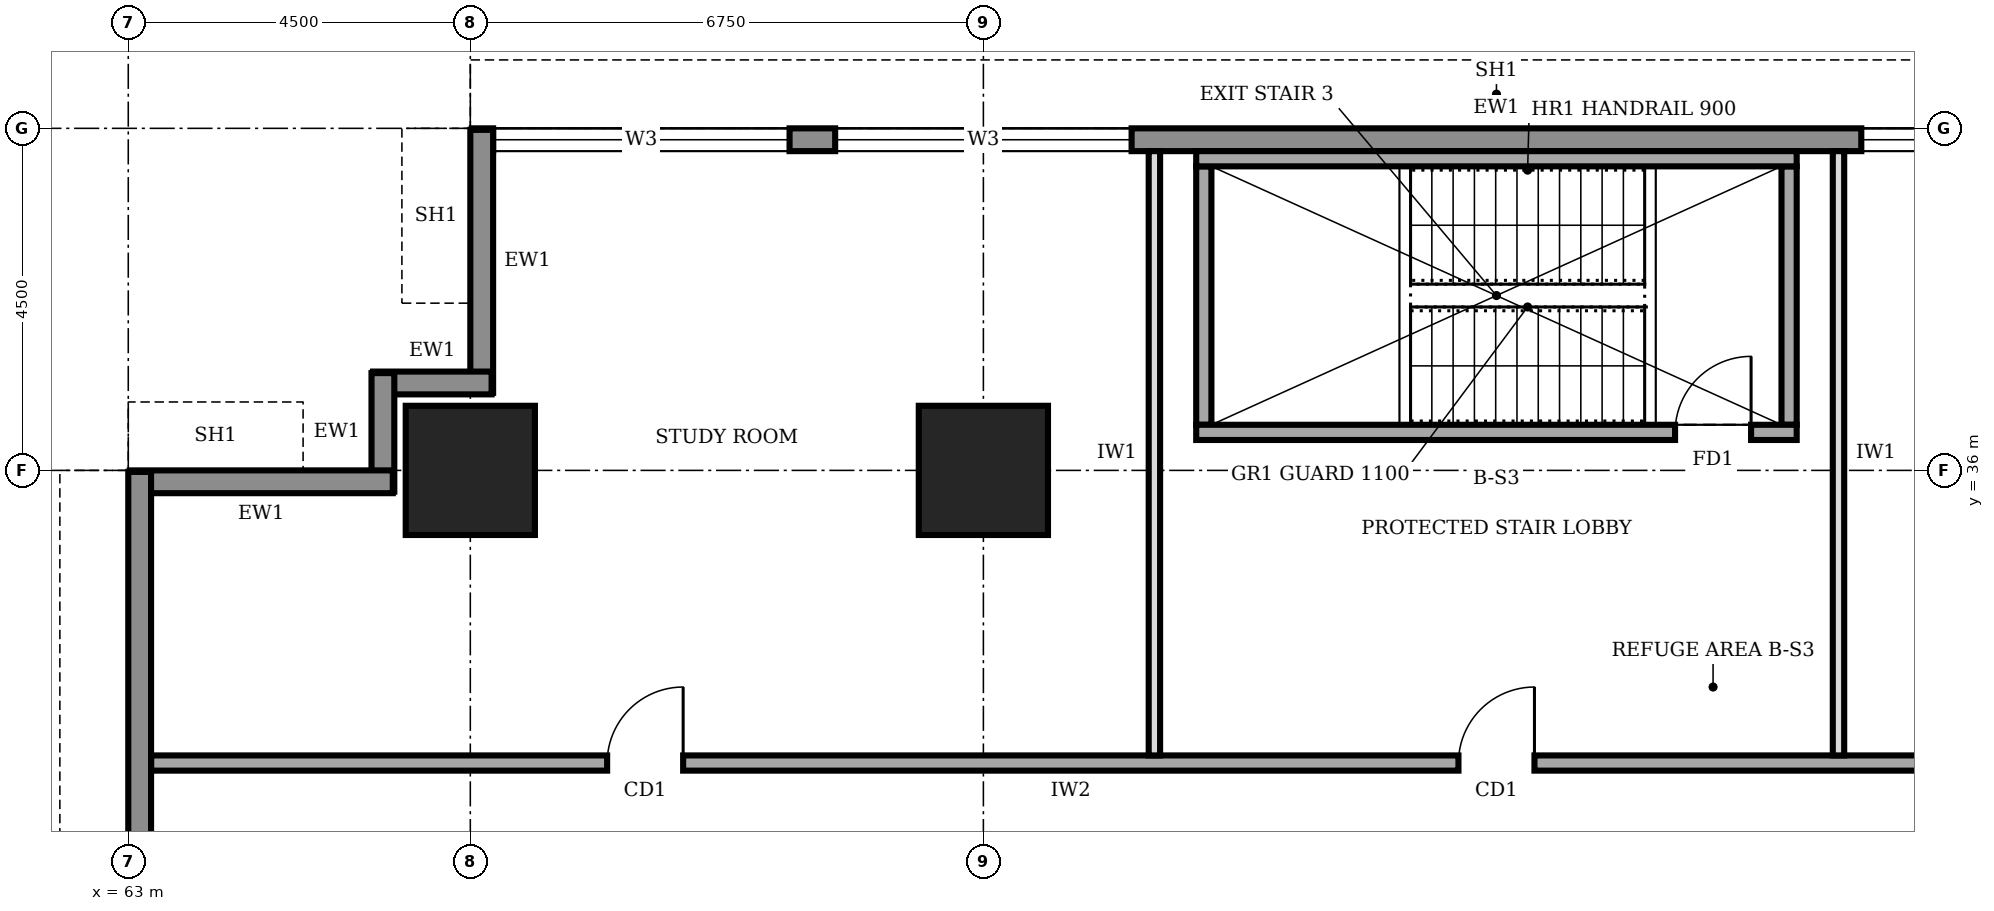
"""IFC4 building model, lengths in metres.
Left out: names, types, materials, properties, quantities, classifications, styles, units other than length and angle.
Written with IfcOpenShell. Run it as: python <this file> out.ifc"""

import sys

from ifc_helpers import new_model, si_unit, direction, frame, frame_2d, origin, origin_2d, place, context, subcontext, project, spatial, rectangle, extrude, element, fill, save


model = new_model("IFC4")
c1 = context("Model", 3, precision=1e-05, world=origin(), true_north=direction((0.0, 1.0)))
c2 = subcontext(c1, "Body", "Model", "MODEL_VIEW")
j1 = project(units=[si_unit("LENGTHUNIT", "METRE"), si_unit("PLANEANGLEUNIT", "RADIAN")], contexts=[c1])
p1 = place(None, origin())
s1 = spatial("IfcSite", under=j1, at=p1, CompositionType="ELEMENT")
p2 = place(p1, origin())
s2 = spatial("IfcBuilding", under=s1, at=p2, CompositionType="ELEMENT")
p3 = place(p2, frame((0.0, 0.0, 101.0)))
s3 = spatial("IfcBuildingStorey", under=s2, at=p3, CompositionType="ELEMENT", Elevation=101.0)
for number, where, z_axis, x_axis in (
    (1, (67.5, 36.0, 0.0), (0.0, 0.0, 1.0), (1.0, 0.0, 0.0)),
    (2, (74.25, 36.0, 0.0), (0.0, 0.0, 1.0), (1.0, 0.0, 0.0)),
):
    element("IfcColumn", number, at=place(p3, frame(where, z_axis=z_axis, x_axis=x_axis)), inside=s3, PredefinedType="COLUMN", context=c2, shape_type="SweptSolid", body=[
        extrude(rectangle(XDim=1.7, YDim=1.7, at=origin_2d()), origin(), (0.0, 0.0, 1.0), 4.0),
    ])
p4 = place(p3, frame((94.48, 40.35, 0.0), z_axis=(0.0, 0.0, 1.0), x_axis=(-1.0, 0.0, 0.0)))
e3 = element("IfcWall", 3, at=p4, inside=s3, PredefinedType="STANDARD", context=c2, shape_type="SweptSolid", body=[
    extrude(rectangle(XDim=26.96, YDim=0.3, at=frame_2d((13.48, 0.0))), origin(), (0.0, 0.0, 1.0), 3.75),
])
p5 = place(p4, frame((22.78, 0.0, 0.95)))
e4 = element("IfcOpeningElement", 4, at=p5, cuts=e3, PredefinedType="OPENING", context=c2, shape_type="SweptSolid", body=[
    extrude(rectangle(XDim=3.9, YDim=1.8, at=frame_2d((1.95, 0.9))), frame((0.0, 0.16, 0.0), z_axis=(0.0, -1.0, 0.0), x_axis=(1.0, 0.0, 0.0)), (0.0, 0.0, 1.0), 0.32),
])
p6 = place(p4, frame((18.28, 0.0, 0.95)))
e5 = element("IfcOpeningElement", 5, at=p6, cuts=e3, PredefinedType="OPENING", context=c2, shape_type="SweptSolid", body=[
    extrude(rectangle(XDim=3.9, YDim=1.8, at=frame_2d((1.95, 0.9))), frame((0.0, 0.16, 0.0), z_axis=(0.0, -1.0, 0.0), x_axis=(1.0, 0.0, 0.0)), (0.0, 0.0, 1.0), 0.32),
])
p7 = place(p4, frame((4.78, 0.0, 0.95)))
e6 = element("IfcOpeningElement", 6, at=p7, cuts=e3, PredefinedType="OPENING", context=c2, shape_type="SweptSolid", body=[
    extrude(rectangle(XDim=3.9, YDim=1.8, at=frame_2d((1.95, 0.9))), frame((0.0, 0.16, 0.0), z_axis=(0.0, -1.0, 0.0), x_axis=(1.0, 0.0, 0.0)), (0.0, 0.0, 1.0), 0.32),
])
p8 = place(p3, frame((67.65, 40.48, 0.0), z_axis=(0.0, 0.0, 1.0), x_axis=(0.0, -1.0, 0.0)))
e7 = element("IfcWall", 7, at=p8, inside=s3, PredefinedType="STANDARD", context=c2, shape_type="SweptSolid", body=[
    extrude(rectangle(XDim=3.46, YDim=0.3, at=frame_2d((1.73, 0.0))), origin(), (0.0, 0.0, 1.0), 2.85),
])
for number, where, z_axis, x_axis in (
    (8, (67.78, 37.15, 0.0), (0.0, 0.0, 1.0), (-1.0, 0.0, 0.0)),
    (9, (66.35, 37.28, 0.0), (0.0, 0.0, 1.0), (0.0, -1.0, 0.0)),
):
    element("IfcWall", number, at=place(p3, frame(where, z_axis=z_axis, x_axis=x_axis)), inside=s3, PredefinedType="STANDARD", context=c2, shape_type="SweptSolid", body=[
        extrude(rectangle(XDim=1.56, YDim=0.3, at=frame_2d((0.78, 0.0))), origin(), (0.0, 0.0, 1.0), 3.75),
    ])
p9 = place(p3, frame((66.48, 35.85, 0.0), z_axis=(0.0, 0.0, 1.0), x_axis=(-1.0, 0.0, 0.0)))
e10 = element("IfcWall", 10, at=p9, inside=s3, PredefinedType="STANDARD", context=c2, shape_type="SweptSolid", body=[
    extrude(rectangle(XDim=3.46, YDim=0.3, at=frame_2d((1.73, 0.0))), origin(), (0.0, 0.0, 1.0), 2.85),
])
p10 = place(p3, frame((63.15, 35.98, 0.0), z_axis=(0.0, 0.0, 1.0), x_axis=(0.0, -1.0, 0.0)))
e11 = element("IfcWall", 11, at=p10, inside=s3, PredefinedType="STANDARD", context=c2, shape_type="SweptSolid", body=[
    extrude(rectangle(XDim=6.73, YDim=0.3, at=frame_2d((3.365, 0.0))), origin(), (0.0, 0.0, 1.0), 3.75),
])
p11 = place(p3, frame((89.35, 32.15, 0.0), z_axis=(0.0, 0.0, 1.0), x_axis=(-1.0, 0.0, 0.0)))
e12 = element("IfcWall", 12, at=p11, inside=s3, PredefinedType="SOLIDWALL", context=c2, shape_type="SweptSolid", body=[
    extrude(rectangle(XDim=26.05, YDim=0.2, at=frame_2d((13.025, 0.0))), origin(), (0.0, 0.0, 1.0), 3.75),
])
p12 = place(p11, frame((19.05, 0.0, 0.0)))
e13 = element("IfcOpeningElement", 13, at=p12, cuts=e12, PredefinedType="OPENING", context=c2, shape_type="SweptSolid", body=[
    extrude(rectangle(XDim=1.0, YDim=2.1, at=frame_2d((0.5, 1.05))), frame((0.0, 0.11, 0.0), z_axis=(0.0, -1.0, 0.0), x_axis=(1.0, 0.0, 0.0)), (0.0, 0.0, 1.0), 0.22),
])
p13 = place(p11, frame((7.85, 0.0, 0.0)))
e14 = element("IfcOpeningElement", 14, at=p13, cuts=e12, PredefinedType="OPENING", context=c2, shape_type="SweptSolid", body=[
    extrude(rectangle(XDim=1.0, YDim=2.1, at=frame_2d((0.5, 1.05))), frame((0.0, 0.11, 0.0), z_axis=(0.0, -1.0, 0.0), x_axis=(1.0, 0.0, 0.0)), (0.0, 0.0, 1.0), 0.22),
])
p14 = place(p11, frame((1.325, 0.0, 0.0)))
e15 = element("IfcOpeningElement", 15, at=p14, cuts=e12, PredefinedType="OPENING", context=c2, shape_type="SweptSolid", body=[
    extrude(rectangle(XDim=1.0, YDim=2.1, at=frame_2d((0.5, 1.05))), frame((0.0, 0.11, 0.0), z_axis=(0.0, -1.0, 0.0), x_axis=(1.0, 0.0, 0.0)), (0.0, 0.0, 1.0), 0.22),
])
for number, where, z_axis, x_axis in (
    (16, (76.5, 32.25, 0.0), (0.0, 0.0, 1.0), (0.0, 1.0, 0.0)),
    (17, (85.5, 32.25, 0.0), (0.0, 0.0, 1.0), (0.0, 1.0, 0.0)),
):
    element("IfcWall", number, at=place(p3, frame(where, z_axis=z_axis, x_axis=x_axis)), inside=s3, PredefinedType="PARTITIONING", context=c2, shape_type="SweptSolid", body=[
        extrude(rectangle(XDim=7.95, YDim=0.15, at=frame_2d((3.975, 0.0))), origin(), (0.0, 0.0, 1.0), 3.75),
    ])
p15 = place(p3, frame((77.05, 36.5, 0.0), z_axis=(0.0, 0.0, 1.0), x_axis=(1.0, 0.0, 0.0)))
e18 = element("IfcWall", 18, at=p15, inside=s3, PredefinedType="SOLIDWALL", context=c2, shape_type="SweptSolid", body=[
    extrude(rectangle(XDim=7.9, YDim=0.2, at=frame_2d((3.95, 0.0))), origin(), (0.0, 0.0, 1.0), 3.75),
])
p16 = place(p15, frame((6.3, 0.0, 0.0)))
e19 = element("IfcOpeningElement", 19, at=p16, cuts=e18, PredefinedType="OPENING", context=c2, shape_type="SweptSolid", body=[
    extrude(rectangle(XDim=1.0, YDim=2.1, at=frame_2d((0.5, 1.05))), frame((0.0, 0.11, 0.0), z_axis=(0.0, -1.0, 0.0), x_axis=(1.0, 0.0, 0.0)), (0.0, 0.0, 1.0), 0.22),
])
p17 = place(p3, frame((77.05, 40.1, 0.0), z_axis=(0.0, 0.0, 1.0), x_axis=(1.0, 0.0, 0.0)))
e20 = element("IfcWall", 20, at=p17, inside=s3, PredefinedType="SOLIDWALL", context=c2, shape_type="SweptSolid", body=[
    extrude(rectangle(XDim=7.9, YDim=0.2, at=frame_2d((3.95, 0.0))), origin(), (0.0, 0.0, 1.0), 3.75),
])
for number, where, z_axis, x_axis in (
    (21, (77.15, 36.6, 0.0), (0.0, 0.0, 1.0), (0.0, 1.0, 0.0)),
    (22, (84.85, 36.6, 0.0), (0.0, 0.0, 1.0), (0.0, 1.0, 0.0)),
):
    element("IfcWall", number, at=place(p3, frame(where, z_axis=z_axis, x_axis=x_axis)), inside=s3, PredefinedType="SOLIDWALL", context=c2, shape_type="SweptSolid", body=[
        extrude(rectangle(XDim=3.4, YDim=0.2, at=frame_2d((1.7, 0.0))), origin(), (0.0, 0.0, 1.0), 3.75),
    ])
p18 = place(p5, origin())
e23 = element("IfcWindow", 23, at=p18, inside=s3, PartitioningType="SINGLE_PANEL", PredefinedType="WINDOW", context=c2, shape_type="SweptSolid", body=[
    extrude(rectangle(XDim=3.9, YDim=1.8, at=frame_2d((1.95, 0.9))), frame((0.0, 0.03, 0.0), z_axis=(0.0, -1.0, 0.0), x_axis=(1.0, 0.0, 0.0)), (0.0, 0.0, 1.0), 0.06),
])
fill(e4, e23)
p19 = place(p6, origin())
e24 = element("IfcWindow", 24, at=p19, inside=s3, PartitioningType="SINGLE_PANEL", PredefinedType="WINDOW", context=c2, shape_type="SweptSolid", body=[
    extrude(rectangle(XDim=3.9, YDim=1.8, at=frame_2d((1.95, 0.9))), frame((0.0, 0.03, 0.0), z_axis=(0.0, -1.0, 0.0), x_axis=(1.0, 0.0, 0.0)), (0.0, 0.0, 1.0), 0.06),
])
fill(e5, e24)
p20 = place(p7, origin())
e25 = element("IfcWindow", 25, at=p20, inside=s3, PartitioningType="SINGLE_PANEL", PredefinedType="WINDOW", context=c2, shape_type="SweptSolid", body=[
    extrude(rectangle(XDim=3.9, YDim=1.8, at=frame_2d((1.95, 0.9))), frame((0.0, 0.03, 0.0), z_axis=(0.0, -1.0, 0.0), x_axis=(1.0, 0.0, 0.0)), (0.0, 0.0, 1.0), 0.06),
])
fill(e6, e25)
p21 = place(p12, frame((1.0, 0.0, 0.0), z_axis=(0.0, 0.0, 1.0), x_axis=(-1.0, 0.0, 0.0)))
e26 = element("IfcDoor", 26, at=p21, inside=s3, OperationType="SINGLE_SWING_RIGHT", PredefinedType="DOOR", context=c2, shape_type="SweptSolid", body=[
    extrude(rectangle(XDim=1.0, YDim=2.1, at=frame_2d((0.5, 1.05))), frame((0.0, 0.025, 0.0), z_axis=(0.0, -1.0, 0.0), x_axis=(1.0, 0.0, 0.0)), (0.0, 0.0, 1.0), 0.05),
])
fill(e13, e26)
p22 = place(p13, frame((1.0, 0.0, 0.0), z_axis=(0.0, 0.0, 1.0), x_axis=(-1.0, 0.0, 0.0)))
e27 = element("IfcDoor", 27, at=p22, inside=s3, OperationType="SINGLE_SWING_RIGHT", PredefinedType="DOOR", context=c2, shape_type="SweptSolid", body=[
    extrude(rectangle(XDim=1.0, YDim=2.1, at=frame_2d((0.5, 1.05))), frame((0.0, 0.025, 0.0), z_axis=(0.0, -1.0, 0.0), x_axis=(1.0, 0.0, 0.0)), (0.0, 0.0, 1.0), 0.05),
])
fill(e14, e27)
p23 = place(p16, origin())
e28 = element("IfcDoor", 28, at=p23, inside=s3, OperationType="SINGLE_SWING_RIGHT", PredefinedType="DOOR", context=c2, shape_type="SweptSolid", body=[
    extrude(rectangle(XDim=1.0, YDim=2.1, at=frame_2d((0.5, 1.05))), frame((0.0, 0.025, 0.0), z_axis=(0.0, -1.0, 0.0), x_axis=(1.0, 0.0, 0.0)), (0.0, 0.0, 1.0), 0.05),
])
fill(e19, e28)
save(model, sys.argv[1])
